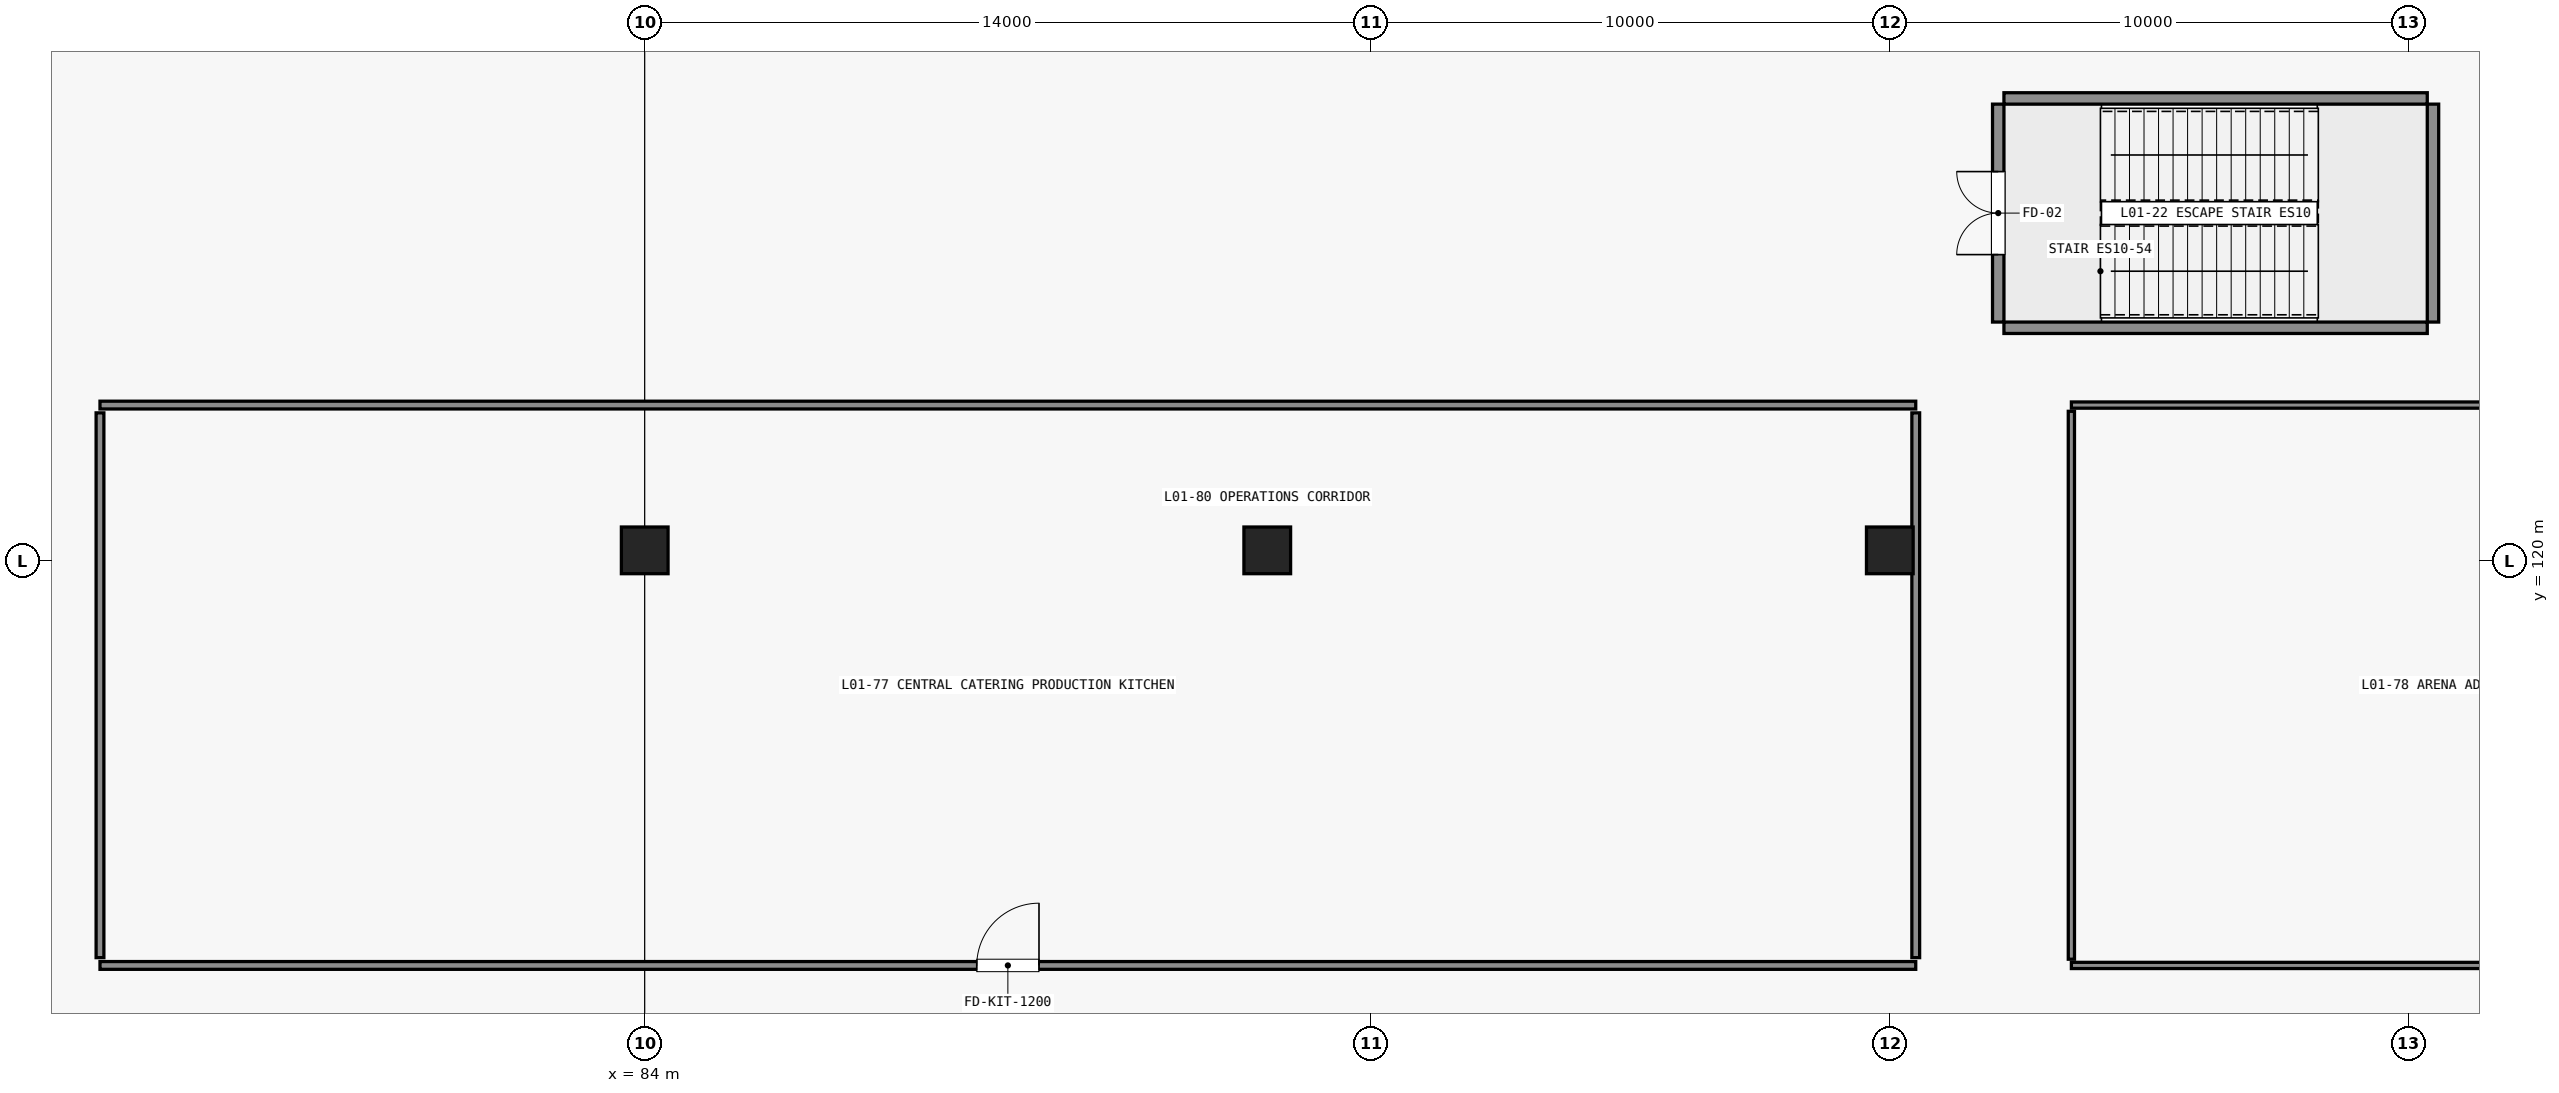
"""IFC4 building model, lengths in metres.
Left out: names, types, materials, properties, quantities, classifications, styles, units other than length and angle.
Written with IfcOpenShell. Run it as: python <this file> out.ifc"""

import sys

from ifc_helpers import new_model, si_unit, direction, frame, frame_2d, origin, origin_2d, place, context, subcontext, project, spatial, rectangle, extrude, element, fill, save


model = new_model("IFC4")
c1 = context("Model", 3, precision=1e-05, world=origin(), true_north=direction((0.0, 1.0)))
c2 = subcontext(c1, "Body", "Model", "MODEL_VIEW")
j1 = project(units=[si_unit("LENGTHUNIT", "METRE"), si_unit("PLANEANGLEUNIT", "RADIAN")], contexts=[c1])
p1 = place(None, origin())
s1 = spatial("IfcSite", under=j1, at=p1, CompositionType="ELEMENT")
p2 = place(p1, origin())
s2 = spatial("IfcBuilding", under=s1, at=p2, CompositionType="ELEMENT")
p3 = place(p2, frame((0.0, 0.0, 6.0)))
s3 = spatial("IfcBuildingStorey", under=s2, at=p3, CompositionType="ELEMENT", Elevation=6.0)
for number, where, z_axis, x_axis in (
    (1, (84.0, 120.2, 0.0), (0.0, 0.0, 1.0), (1.0, 0.0, 0.0)),
    (2, (96.0, 120.2, 0.0), (0.0, 0.0, 1.0), (1.0, 0.0, 0.0)),
    (3, (108.0, 120.2, 0.0), (0.0, 0.0, 1.0), (1.0, 0.0, 0.0)),
):
    element("IfcColumn", number, at=place(p3, frame(where, z_axis=z_axis, x_axis=x_axis)), inside=s3, PredefinedType="COLUMN", context=c2, shape_type="SweptSolid", body=[
        extrude(rectangle(XDim=0.9, YDim=0.9, at=origin_2d()), origin(), (0.0, 0.0, 1.0), 5.4),
    ])
for number, where, z_axis, x_axis in (
    (4, (110.2, 124.49, 0.0), (0.0, 0.0, 1.0), (1.0, 0.0, 0.0)),
    (5, (110.2, 128.91, 0.0), (0.0, 0.0, 1.0), (1.0, 0.0, 0.0)),
):
    element("IfcWall", number, at=place(p3, frame(where, z_axis=z_axis, x_axis=x_axis)), inside=s3, PredefinedType="SHEAR", context=c2, shape_type="SweptSolid", body=[
        extrude(rectangle(XDim=8.16, YDim=0.22, at=frame_2d((4.08, 0.0))), origin(), (0.0, 0.0, 1.0), 5.4),
    ])
p4 = place(p3, frame((110.09, 124.6, 0.0), z_axis=(0.0, 0.0, 1.0), x_axis=(0.0, 1.0, 0.0)))
e6 = element("IfcWall", 6, at=p4, inside=s3, PredefinedType="SHEAR", context=c2, shape_type="SweptSolid", body=[
    extrude(rectangle(XDim=4.2, YDim=0.22, at=frame_2d((2.1, 0.0))), origin(), (0.0, 0.0, 1.0), 5.4),
])
p5 = place(p4, frame((1.3, 0.0, 0.0)))
e7 = element("IfcOpeningElement", 7, at=p5, cuts=e6, PredefinedType="OPENING", context=c2, shape_type="SweptSolid", body=[
    extrude(rectangle(XDim=1.6, YDim=2.2, at=frame_2d((0.8, 1.1))), frame((0.0, 0.12, 0.0), z_axis=(0.0, -1.0, 0.0), x_axis=(1.0, 0.0, 0.0)), (0.0, 0.0, 1.0), 0.24),
])
p6 = place(p3, frame((118.47, 124.6, 0.0), z_axis=(0.0, 0.0, 1.0), x_axis=(0.0, 1.0, 0.0)))
e8 = element("IfcWall", 8, at=p6, inside=s3, PredefinedType="SHEAR", context=c2, shape_type="SweptSolid", body=[
    extrude(rectangle(XDim=4.2, YDim=0.22, at=frame_2d((2.1, 0.0))), origin(), (0.0, 0.0, 1.0), 5.4),
])
p7 = place(p3, frame((73.5, 112.2, 0.0), z_axis=(0.0, 0.0, 1.0), x_axis=(1.0, 0.0, 0.0)))
e9 = element("IfcWall", 9, at=p7, inside=s3, PredefinedType="STANDARD", context=c2, shape_type="SweptSolid", body=[
    extrude(rectangle(XDim=35.0, YDim=0.15, at=frame_2d((17.5, 0.0))), origin(), (0.0, 0.0, 1.0), 4.428),
])
p8 = place(p7, frame((16.9, 0.0, 0.0)))
e10 = element("IfcOpeningElement", 10, at=p8, cuts=e9, PredefinedType="OPENING", context=c2, shape_type="SweptSolid", body=[
    extrude(rectangle(XDim=1.2, YDim=2.2, at=frame_2d((0.6, 1.1))), frame((0.0, 0.085, 0.0), z_axis=(0.0, -1.0, 0.0), x_axis=(1.0, 0.0, 0.0)), (0.0, 0.0, 1.0), 0.17),
])
p9 = place(p3, frame((73.5, 123.0, 0.0), z_axis=(0.0, 0.0, 1.0), x_axis=(1.0, 0.0, 0.0)))
e11 = element("IfcWall", 11, at=p9, inside=s3, PredefinedType="STANDARD", context=c2, shape_type="SweptSolid", body=[
    extrude(rectangle(XDim=35.0, YDim=0.15, at=frame_2d((17.5, 0.0))), origin(), (0.0, 0.0, 1.0), 4.428),
])
for number, where, z_axis, x_axis in (
    (12, (73.5, 112.35, 0.0), (0.0, 0.0, 1.0), (0.0, 1.0, 0.0)),
    (13, (108.5, 112.35, 0.0), (0.0, 0.0, 1.0), (0.0, 1.0, 0.0)),
):
    element("IfcWall", number, at=place(p3, frame(where, z_axis=z_axis, x_axis=x_axis)), inside=s3, PredefinedType="STANDARD", context=c2, shape_type="SweptSolid", body=[
        extrude(rectangle(XDim=10.5, YDim=0.15, at=frame_2d((5.25, 0.0))), origin(), (0.0, 0.0, 1.0), 4.428),
    ])
p10 = place(p3, frame((111.5, 112.2, 0.0), z_axis=(0.0, 0.0, 1.0), x_axis=(1.0, 0.0, 0.0)))
e14 = element("IfcWall", 14, at=p10, inside=s3, PredefinedType="PARTITIONING", context=c2, shape_type="SweptSolid", body=[
    extrude(rectangle(XDim=32.5, YDim=0.12, at=frame_2d((16.25, 0.0))), origin(), (0.0, 0.0, 1.0), 4.428),
])
p11 = place(p10, frame((15.7, 0.0, 0.0)))
e15 = element("IfcOpeningElement", 15, at=p11, cuts=e14, PredefinedType="OPENING", context=c2, shape_type="SweptSolid", body=[
    extrude(rectangle(XDim=1.1, YDim=2.2, at=frame_2d((0.55, 1.1))), frame((0.0, 0.07, 0.0), z_axis=(0.0, -1.0, 0.0), x_axis=(1.0, 0.0, 0.0)), (0.0, 0.0, 1.0), 0.14),
])
p12 = place(p3, frame((111.5, 123.0, 0.0), z_axis=(0.0, 0.0, 1.0), x_axis=(1.0, 0.0, 0.0)))
e16 = element("IfcWall", 16, at=p12, inside=s3, PredefinedType="PARTITIONING", context=c2, shape_type="SweptSolid", body=[
    extrude(rectangle(XDim=32.5, YDim=0.12, at=frame_2d((16.25, 0.0))), origin(), (0.0, 0.0, 1.0), 4.428),
])
p13 = place(p3, frame((111.5, 112.32, 0.0), z_axis=(0.0, 0.0, 1.0), x_axis=(0.0, 1.0, 0.0)))
e17 = element("IfcWall", 17, at=p13, inside=s3, PredefinedType="PARTITIONING", context=c2, shape_type="SweptSolid", body=[
    extrude(rectangle(XDim=10.56, YDim=0.12, at=frame_2d((5.28, 0.0))), origin(), (0.0, 0.0, 1.0), 4.428),
])
p14 = place(p5, origin())
e18 = element("IfcDoor", 18, at=p14, inside=s3, OperationType="DOUBLE_DOOR_SINGLE_SWING", PredefinedType="DOOR", context=c2, shape_type="SweptSolid", body=[
    extrude(rectangle(XDim=1.6, YDim=2.2, at=frame_2d((0.8, 1.1))), frame((0.0, 0.025, 0.0), z_axis=(0.0, -1.0, 0.0), x_axis=(1.0, 0.0, 0.0)), (0.0, 0.0, 1.0), 0.05),
])
fill(e7, e18)
p15 = place(p8, origin())
e19 = element("IfcDoor", 19, at=p15, inside=s3, OperationType="SINGLE_SWING_RIGHT", PredefinedType="DOOR", context=c2, shape_type="SweptSolid", body=[
    extrude(rectangle(XDim=1.2, YDim=2.2, at=frame_2d((0.6, 1.1))), frame((0.0, 0.025, 0.0), z_axis=(0.0, -1.0, 0.0), x_axis=(1.0, 0.0, 0.0)), (0.0, 0.0, 1.0), 0.05),
])
fill(e10, e19)
save(model, sys.argv[1])
